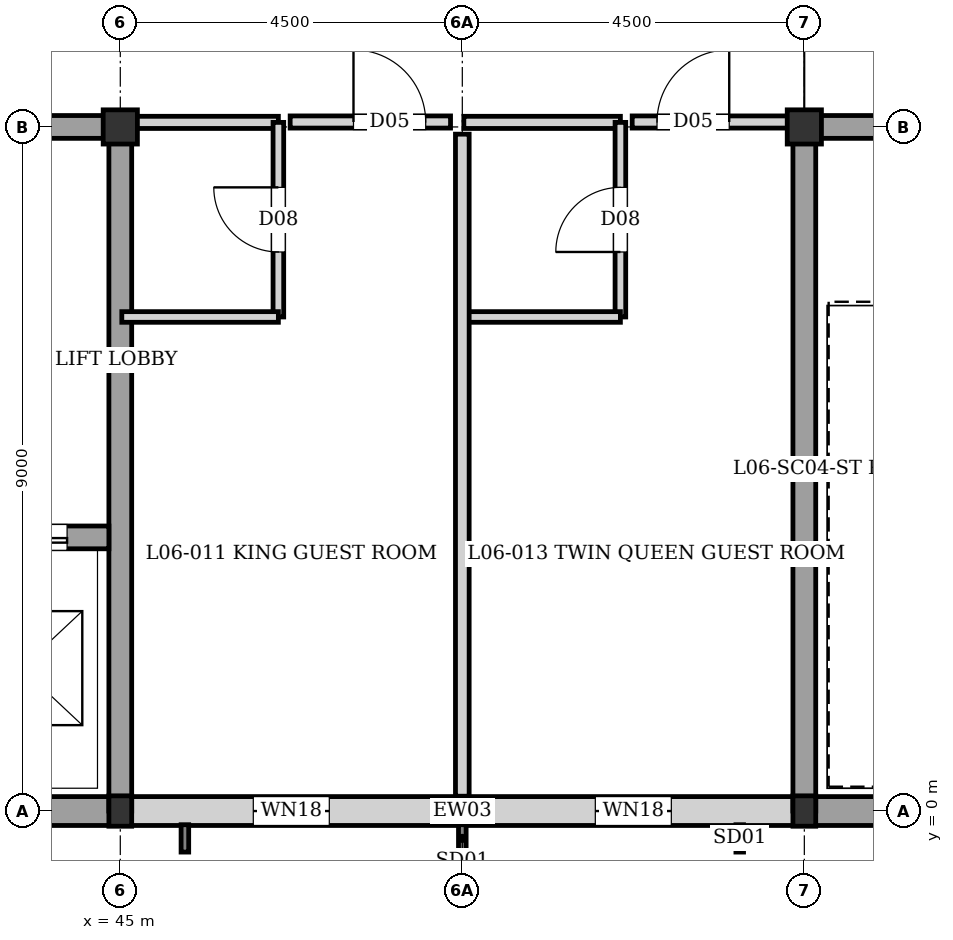
"""IFC4 building model, lengths in metres.
Left out: names, types, materials, properties, quantities, classifications, styles, units other than length and angle.
Written with IfcOpenShell. Run it as: python <this file> out.ifc"""

import sys

from ifc_helpers import new_model, si_unit, direction, frame, frame_2d, origin, origin_2d, place, context, subcontext, project, spatial, rectangle, i_section, extrude, element, fill, save


model = new_model("IFC4")
c1 = context("Model", 3, precision=1e-05, world=origin(), true_north=direction((0.0, 1.0)))
c2 = subcontext(c1, "Body", "Model", "MODEL_VIEW")
j1 = project(units=[si_unit("LENGTHUNIT", "METRE"), si_unit("PLANEANGLEUNIT", "RADIAN")], contexts=[c1])
p1 = place(None, origin())
s1 = spatial("IfcSite", under=j1, at=p1, CompositionType="ELEMENT")
p2 = place(p1, origin())
s2 = spatial("IfcBuilding", under=s1, at=p2, CompositionType="ELEMENT")
p3 = place(p2, frame((0.0, 0.0, 20.64)))
s3 = spatial("IfcBuildingStorey", under=s2, at=p3, CompositionType="ELEMENT", Elevation=20.64)
p4 = place(p3, frame((45.0, 0.0, 0.0), z_axis=(0.0, 0.0, 1.0), x_axis=(1.0, 0.0, 0.0)))
e1 = element("IfcColumn", 1, at=p4, inside=s3, PredefinedType="COLUMN", context=c2, shape_type="SweptSolid", body=[
    extrude(i_section(OverallWidth=0.3, OverallDepth=0.4, WebThickness=0.013, FlangeThickness=0.024, at=origin_2d()), origin(), (0.0, 0.0, 1.0), 3.04),
])
p5 = place(p3, frame((45.0, 9.0, 0.0), z_axis=(0.0, 0.0, 1.0), x_axis=(1.0, 0.0, 0.0)))
e2 = element("IfcColumn", 2, at=p5, inside=s3, PredefinedType="COLUMN", context=c2, shape_type="SweptSolid", body=[
    extrude(rectangle(XDim=0.45, YDim=0.45, at=origin_2d()), origin(), (0.0, 0.0, 1.0), 3.04),
])
p6 = place(p3, frame((54.0, 0.0, 0.0), z_axis=(0.0, 0.0, 1.0), x_axis=(1.0, 0.0, 0.0)))
e3 = element("IfcColumn", 3, at=p6, inside=s3, PredefinedType="COLUMN", context=c2, shape_type="SweptSolid", body=[
    extrude(i_section(OverallWidth=0.3, OverallDepth=0.4, WebThickness=0.013, FlangeThickness=0.024, at=origin_2d()), origin(), (0.0, 0.0, 1.0), 3.04),
])
p7 = place(p3, frame((54.0, 9.0, 0.0), z_axis=(0.0, 0.0, 1.0), x_axis=(1.0, 0.0, 0.0)))
e4 = element("IfcColumn", 4, at=p7, inside=s3, PredefinedType="COLUMN", context=c2, shape_type="SweptSolid", body=[
    extrude(rectangle(XDim=0.45, YDim=0.45, at=origin_2d()), origin(), (0.0, 0.0, 1.0), 3.04),
])
p8 = place(p3, frame((63.0, 0.0, 0.0), z_axis=(0.0, 0.0, 1.0), x_axis=(-1.0, 0.0, 0.0)))
e5 = element("IfcWall", 5, at=p8, inside=s3, PredefinedType="SOLIDWALL", context=c2, shape_type="SweptSolid", body=[
    extrude(rectangle(XDim=9.0, YDim=0.38, at=frame_2d((4.5, 0.0))), origin(), (0.0, 0.0, 1.0), 2.82),
])
p9 = place(p3, frame((53.87, 0.0, 0.0), z_axis=(0.0, 0.0, 1.0), x_axis=(-1.0, 0.0, 0.0)))
e6 = element("IfcWall", 6, at=p9, inside=s3, PredefinedType="SOLIDWALL", context=c2, shape_type="SweptSolid", body=[
    extrude(rectangle(XDim=8.74, YDim=0.38, at=frame_2d((4.37, 0.0))), origin(), (0.0, 0.0, 1.0), 2.48),
])
p10 = place(p9, frame((1.62, 0.0, 0.35)))
e7 = element("IfcOpeningElement", 7, at=p10, cuts=e6, PredefinedType="OPENING", context=c2, shape_type="SweptSolid", body=[
    extrude(rectangle(XDim=1.0, YDim=1.6, at=frame_2d((0.5, 0.8))), frame((0.0, 0.2, 0.0), z_axis=(0.0, -1.0, 0.0), x_axis=(1.0, 0.0, 0.0)), (0.0, 0.0, 1.0), 0.4),
])
p11 = place(p9, frame((6.12, 0.0, 0.35)))
e8 = element("IfcOpeningElement", 8, at=p11, cuts=e6, PredefinedType="OPENING", context=c2, shape_type="SweptSolid", body=[
    extrude(rectangle(XDim=1.0, YDim=1.6, at=frame_2d((0.5, 0.8))), frame((0.0, 0.2, 0.0), z_axis=(0.0, -1.0, 0.0), x_axis=(1.0, 0.0, 0.0)), (0.0, 0.0, 1.0), 0.4),
])
p12 = place(p3, frame((45.0, 0.0, 0.0), z_axis=(0.0, 0.0, 1.0), x_axis=(-1.0, 0.0, 0.0)))
e9 = element("IfcWall", 9, at=p12, inside=s3, PredefinedType="SOLIDWALL", context=c2, shape_type="SweptSolid", body=[
    extrude(rectangle(XDim=9.0, YDim=0.38, at=frame_2d((4.5, 0.0))), origin(), (0.0, 0.0, 1.0), 2.82),
])
p13 = place(p3, frame((45.0, 0.0, 0.0), z_axis=(0.0, 0.0, 1.0), x_axis=(0.0, 1.0, 0.0)))
e10 = element("IfcWall", 10, at=p13, inside=s3, PredefinedType="SHEAR", context=c2, shape_type="SweptSolid", body=[
    extrude(rectangle(XDim=9.0, YDim=0.3, at=frame_2d((4.5, 0.0))), origin(), (0.0, 0.0, 1.0), 2.82),
])
p14 = place(p3, frame((36.0, 9.0, 0.0), z_axis=(0.0, 0.0, 1.0), x_axis=(1.0, 0.0, 0.0)))
e11 = element("IfcWall", 11, at=p14, inside=s3, PredefinedType="SHEAR", context=c2, shape_type="SweptSolid", body=[
    extrude(rectangle(XDim=9.0, YDim=0.3, at=frame_2d((4.5, 0.0))), origin(), (0.0, 0.0, 1.0), 2.82),
])
p15 = place(p14, frame((5.95, 0.0, 0.0)))
e12 = element("IfcOpeningElement", 12, at=p15, cuts=e11, PredefinedType="OPENING", context=c2, shape_type="SweptSolid", body=[
    extrude(rectangle(XDim=1.6, YDim=2.1, at=frame_2d((0.8, 1.05))), frame((0.0, 0.16, 0.0), z_axis=(0.0, -1.0, 0.0), x_axis=(1.0, 0.0, 0.0)), (0.0, 0.0, 1.0), 0.32),
])
p16 = place(p3, frame((40.65, 3.6, 0.0), z_axis=(0.0, 0.0, 1.0), x_axis=(1.0, 0.0, 0.0)))
e13 = element("IfcWall", 13, at=p16, inside=s3, PredefinedType="SHEAR", context=c2, shape_type="SweptSolid", body=[
    extrude(rectangle(XDim=4.2, YDim=0.3, at=frame_2d((2.1, 0.0))), origin(), (0.0, 0.0, 1.0), 2.82),
])
p17 = place(p16, frame((0.55, 0.0, 0.0)))
e14 = element("IfcOpeningElement", 14, at=p17, cuts=e13, PredefinedType="OPENING", context=c2, shape_type="SweptSolid", body=[
    extrude(rectangle(XDim=1.1, YDim=2.1, at=frame_2d((0.55, 1.05))), frame((0.0, 0.16, 0.0), z_axis=(0.0, -1.0, 0.0), x_axis=(1.0, 0.0, 0.0)), (0.0, 0.0, 1.0), 0.32),
])
p18 = place(p16, frame((2.45, 0.0, 0.0)))
e15 = element("IfcOpeningElement", 15, at=p18, cuts=e13, PredefinedType="OPENING", context=c2, shape_type="SweptSolid", body=[
    extrude(rectangle(XDim=1.2, YDim=2.2, at=frame_2d((0.6, 1.1))), frame((0.0, 0.16, 0.0), z_axis=(0.0, -1.0, 0.0), x_axis=(1.0, 0.0, 0.0)), (0.0, 0.0, 1.0), 0.32),
])
p19 = place(p3, frame((54.0, 9.0, 0.0), z_axis=(0.0, 0.0, 1.0), x_axis=(1.0, 0.0, 0.0)))
e16 = element("IfcWall", 16, at=p19, inside=s3, PredefinedType="SHEAR", context=c2, shape_type="SweptSolid", body=[
    extrude(rectangle(XDim=9.0, YDim=0.3, at=frame_2d((4.5, 0.0))), origin(), (0.0, 0.0, 1.0), 2.82),
])
p20 = place(p19, frame((6.05, 0.0, 0.0)))
e17 = element("IfcOpeningElement", 17, at=p20, cuts=e16, PredefinedType="OPENING", context=c2, shape_type="SweptSolid", body=[
    extrude(rectangle(XDim=1.4, YDim=2.02, at=frame_2d((0.7, 1.01))), frame((0.0, 0.16, 0.0), z_axis=(0.0, -1.0, 0.0), x_axis=(1.0, 0.0, 0.0)), (0.0, 0.0, 1.0), 0.32),
])
p21 = place(p3, frame((54.0, 0.0, 0.0), z_axis=(0.0, 0.0, 1.0), x_axis=(0.0, 1.0, 0.0)))
e18 = element("IfcWall", 18, at=p21, inside=s3, PredefinedType="SHEAR", context=c2, shape_type="SweptSolid", body=[
    extrude(rectangle(XDim=9.0, YDim=0.3, at=frame_2d((4.5, 0.0))), origin(), (0.0, 0.0, 1.0), 2.82),
])
p22 = place(p3, frame((45.02, 9.06, 0.0), z_axis=(0.0, 0.0, 1.0), x_axis=(1.0, 0.0, 0.0)))
e19 = element("IfcWall", 19, at=p22, inside=s3, PredefinedType="PARTITIONING", context=c2, shape_type="SweptSolid", body=[
    extrude(rectangle(XDim=2.06, YDim=0.16, at=frame_2d((1.03, 0.0))), origin(), (0.0, 0.0, 1.0), 2.33),
])
p23 = place(p3, frame((47.08, 6.5, 0.0), z_axis=(0.0, 0.0, 1.0), x_axis=(0.0, 1.0, 0.0)))
e20 = element("IfcWall", 20, at=p23, inside=s3, PredefinedType="PLUMBINGWALL", context=c2, shape_type="SweptSolid", body=[
    extrude(rectangle(XDim=2.56, YDim=0.14, at=frame_2d((1.28, 0.0))), origin(), (0.0, 0.0, 1.0), 2.82),
])
p24 = place(p23, frame((0.855, 0.0, 0.0)))
e21 = element("IfcOpeningElement", 21, at=p24, cuts=e20, PredefinedType="OPENING", context=c2, shape_type="SweptSolid", body=[
    extrude(rectangle(XDim=0.85, YDim=2.04, at=frame_2d((0.425, 1.02))), frame((0.0, 0.08, 0.0), z_axis=(0.0, -1.0, 0.0), x_axis=(1.0, 0.0, 0.0)), (0.0, 0.0, 1.0), 0.16),
])
p25 = place(p3, frame((45.02, 6.5, 0.0), z_axis=(0.0, 0.0, 1.0), x_axis=(1.0, 0.0, 0.0)))
e22 = element("IfcWall", 22, at=p25, inside=s3, PredefinedType="PLUMBINGWALL", context=c2, shape_type="SweptSolid", body=[
    extrude(rectangle(XDim=2.06, YDim=0.14, at=frame_2d((1.03, 0.0))), origin(), (0.0, 0.0, 1.0), 2.82),
])
p26 = place(p3, frame((49.52, 9.06, 0.0), z_axis=(0.0, 0.0, 1.0), x_axis=(1.0, 0.0, 0.0)))
e23 = element("IfcWall", 23, at=p26, inside=s3, PredefinedType="PARTITIONING", context=c2, shape_type="SweptSolid", body=[
    extrude(rectangle(XDim=2.06, YDim=0.16, at=frame_2d((1.03, 0.0))), origin(), (0.0, 0.0, 1.0), 2.33),
])
p27 = place(p3, frame((51.58, 6.5, 0.0), z_axis=(0.0, 0.0, 1.0), x_axis=(0.0, 1.0, 0.0)))
e24 = element("IfcWall", 24, at=p27, inside=s3, PredefinedType="PLUMBINGWALL", context=c2, shape_type="SweptSolid", body=[
    extrude(rectangle(XDim=2.56, YDim=0.14, at=frame_2d((1.28, 0.0))), origin(), (0.0, 0.0, 1.0), 2.82),
])
p28 = place(p27, frame((0.855, 0.0, 0.0)))
e25 = element("IfcOpeningElement", 25, at=p28, cuts=e24, PredefinedType="OPENING", context=c2, shape_type="SweptSolid", body=[
    extrude(rectangle(XDim=0.85, YDim=2.04, at=frame_2d((0.425, 1.02))), frame((0.0, 0.08, 0.0), z_axis=(0.0, -1.0, 0.0), x_axis=(1.0, 0.0, 0.0)), (0.0, 0.0, 1.0), 0.16),
])
p29 = place(p3, frame((49.52, 6.5, 0.0), z_axis=(0.0, 0.0, 1.0), x_axis=(1.0, 0.0, 0.0)))
e26 = element("IfcWall", 26, at=p29, inside=s3, PredefinedType="PLUMBINGWALL", context=c2, shape_type="SweptSolid", body=[
    extrude(rectangle(XDim=2.06, YDim=0.14, at=frame_2d((1.03, 0.0))), origin(), (0.0, 0.0, 1.0), 2.82),
])
p30 = place(p3, frame((49.5, 0.195, 0.0), z_axis=(0.0, 0.0, 1.0), x_axis=(0.0, 1.0, 0.0)))
e27 = element("IfcWall", 27, at=p30, inside=s3, PredefinedType="PARTITIONING", context=c2, shape_type="SweptSolid", body=[
    extrude(rectangle(XDim=8.71, YDim=0.18, at=frame_2d((4.355, 0.0))), origin(), (0.0, 0.0, 1.0), 2.82),
])
p31 = place(p3, frame((47.235, 9.065, 0.0), z_axis=(0.0, 0.0, 1.0), x_axis=(1.0, 0.0, 0.0)))
e28 = element("IfcWall", 28, at=p31, inside=s3, PredefinedType="PARTITIONING", context=c2, shape_type="SweptSolid", body=[
    extrude(rectangle(XDim=2.11, YDim=0.16, at=frame_2d((1.055, 0.0))), origin(), (0.0, 0.0, 1.0), 2.33),
])
p32 = place(p31, frame((0.833, 0.0, 0.0)))
e29 = element("IfcOpeningElement", 29, at=p32, cuts=e28, PredefinedType="OPENING", context=c2, shape_type="SweptSolid", body=[
    extrude(rectangle(XDim=0.95, YDim=2.15, at=frame_2d((0.475, 1.075))), frame((0.0, 0.09, 0.0), z_axis=(0.0, -1.0, 0.0), x_axis=(1.0, 0.0, 0.0)), (0.0, 0.0, 1.0), 0.18),
])
p33 = place(p3, frame((51.735, 9.065, 0.0), z_axis=(0.0, 0.0, 1.0), x_axis=(1.0, 0.0, 0.0)))
e30 = element("IfcWall", 30, at=p33, inside=s3, PredefinedType="PARTITIONING", context=c2, shape_type="SweptSolid", body=[
    extrude(rectangle(XDim=2.11, YDim=0.16, at=frame_2d((1.055, 0.0))), origin(), (0.0, 0.0, 1.0), 2.33),
])
p34 = place(p33, frame((0.327, 0.0, 0.0)))
e31 = element("IfcOpeningElement", 31, at=p34, cuts=e30, PredefinedType="OPENING", context=c2, shape_type="SweptSolid", body=[
    extrude(rectangle(XDim=0.95, YDim=2.15, at=frame_2d((0.475, 1.075))), frame((0.0, 0.09, 0.0), z_axis=(0.0, -1.0, 0.0), x_axis=(1.0, 0.0, 0.0)), (0.0, 0.0, 1.0), 0.18),
])
p35 = place(p10, origin())
e32 = element("IfcWindow", 32, at=p35, inside=s3, PartitioningType="SINGLE_PANEL", PredefinedType="WINDOW", context=c2, shape_type="SweptSolid", body=[
    extrude(rectangle(XDim=1.0, YDim=1.6, at=frame_2d((0.5, 0.8))), frame((0.0, 0.03, 0.0), z_axis=(0.0, -1.0, 0.0), x_axis=(1.0, 0.0, 0.0)), (0.0, 0.0, 1.0), 0.06),
])
fill(e7, e32)
p36 = place(p11, origin())
e33 = element("IfcWindow", 33, at=p36, inside=s3, PartitioningType="SINGLE_PANEL", PredefinedType="WINDOW", context=c2, shape_type="SweptSolid", body=[
    extrude(rectangle(XDim=1.0, YDim=1.6, at=frame_2d((0.5, 0.8))), frame((0.0, 0.03, 0.0), z_axis=(0.0, -1.0, 0.0), x_axis=(1.0, 0.0, 0.0)), (0.0, 0.0, 1.0), 0.06),
])
fill(e8, e33)
p37 = place(p18, origin())
e34 = element("IfcDoor", 34, at=p37, inside=s3, OperationType="DOUBLE_DOOR_SLIDING", PredefinedType="DOOR", context=c2, shape_type="SweptSolid", body=[
    extrude(rectangle(XDim=1.2, YDim=2.2, at=frame_2d((0.6, 1.1))), frame((0.0, 0.025, 0.0), z_axis=(0.0, -1.0, 0.0), x_axis=(1.0, 0.0, 0.0)), (0.0, 0.0, 1.0), 0.05),
])
fill(e15, e34)
p38 = place(p24, origin())
e35 = element("IfcDoor", 35, at=p38, inside=s3, OperationType="SINGLE_SWING_RIGHT", PredefinedType="DOOR", context=c2, shape_type="SweptSolid", body=[
    extrude(rectangle(XDim=0.85, YDim=2.04, at=frame_2d((0.425, 1.02))), frame((0.0, 0.025, 0.0), z_axis=(0.0, -1.0, 0.0), x_axis=(1.0, 0.0, 0.0)), (0.0, 0.0, 1.0), 0.05),
])
fill(e21, e35)
p39 = place(p28, origin())
e36 = element("IfcDoor", 36, at=p39, inside=s3, OperationType="SINGLE_SWING_LEFT", PredefinedType="DOOR", context=c2, shape_type="SweptSolid", body=[
    extrude(rectangle(XDim=0.85, YDim=2.04, at=frame_2d((0.425, 1.02))), frame((0.0, 0.025, 0.0), z_axis=(0.0, -1.0, 0.0), x_axis=(1.0, 0.0, 0.0)), (0.0, 0.0, 1.0), 0.05),
])
fill(e25, e36)
p40 = place(p32, origin())
e37 = element("IfcDoor", 37, at=p40, inside=s3, OperationType="SINGLE_SWING_LEFT", PredefinedType="DOOR", context=c2, shape_type="SweptSolid", body=[
    extrude(rectangle(XDim=0.95, YDim=2.15, at=frame_2d((0.475, 1.075))), frame((0.0, 0.025, 0.0), z_axis=(0.0, -1.0, 0.0), x_axis=(1.0, 0.0, 0.0)), (0.0, 0.0, 1.0), 0.05),
])
fill(e29, e37)
p41 = place(p34, origin())
e38 = element("IfcDoor", 38, at=p41, inside=s3, OperationType="SINGLE_SWING_RIGHT", PredefinedType="DOOR", context=c2, shape_type="SweptSolid", body=[
    extrude(rectangle(XDim=0.95, YDim=2.15, at=frame_2d((0.475, 1.075))), frame((0.0, 0.025, 0.0), z_axis=(0.0, -1.0, 0.0), x_axis=(1.0, 0.0, 0.0)), (0.0, 0.0, 1.0), 0.05),
])
fill(e31, e38)
save(model, sys.argv[1])
